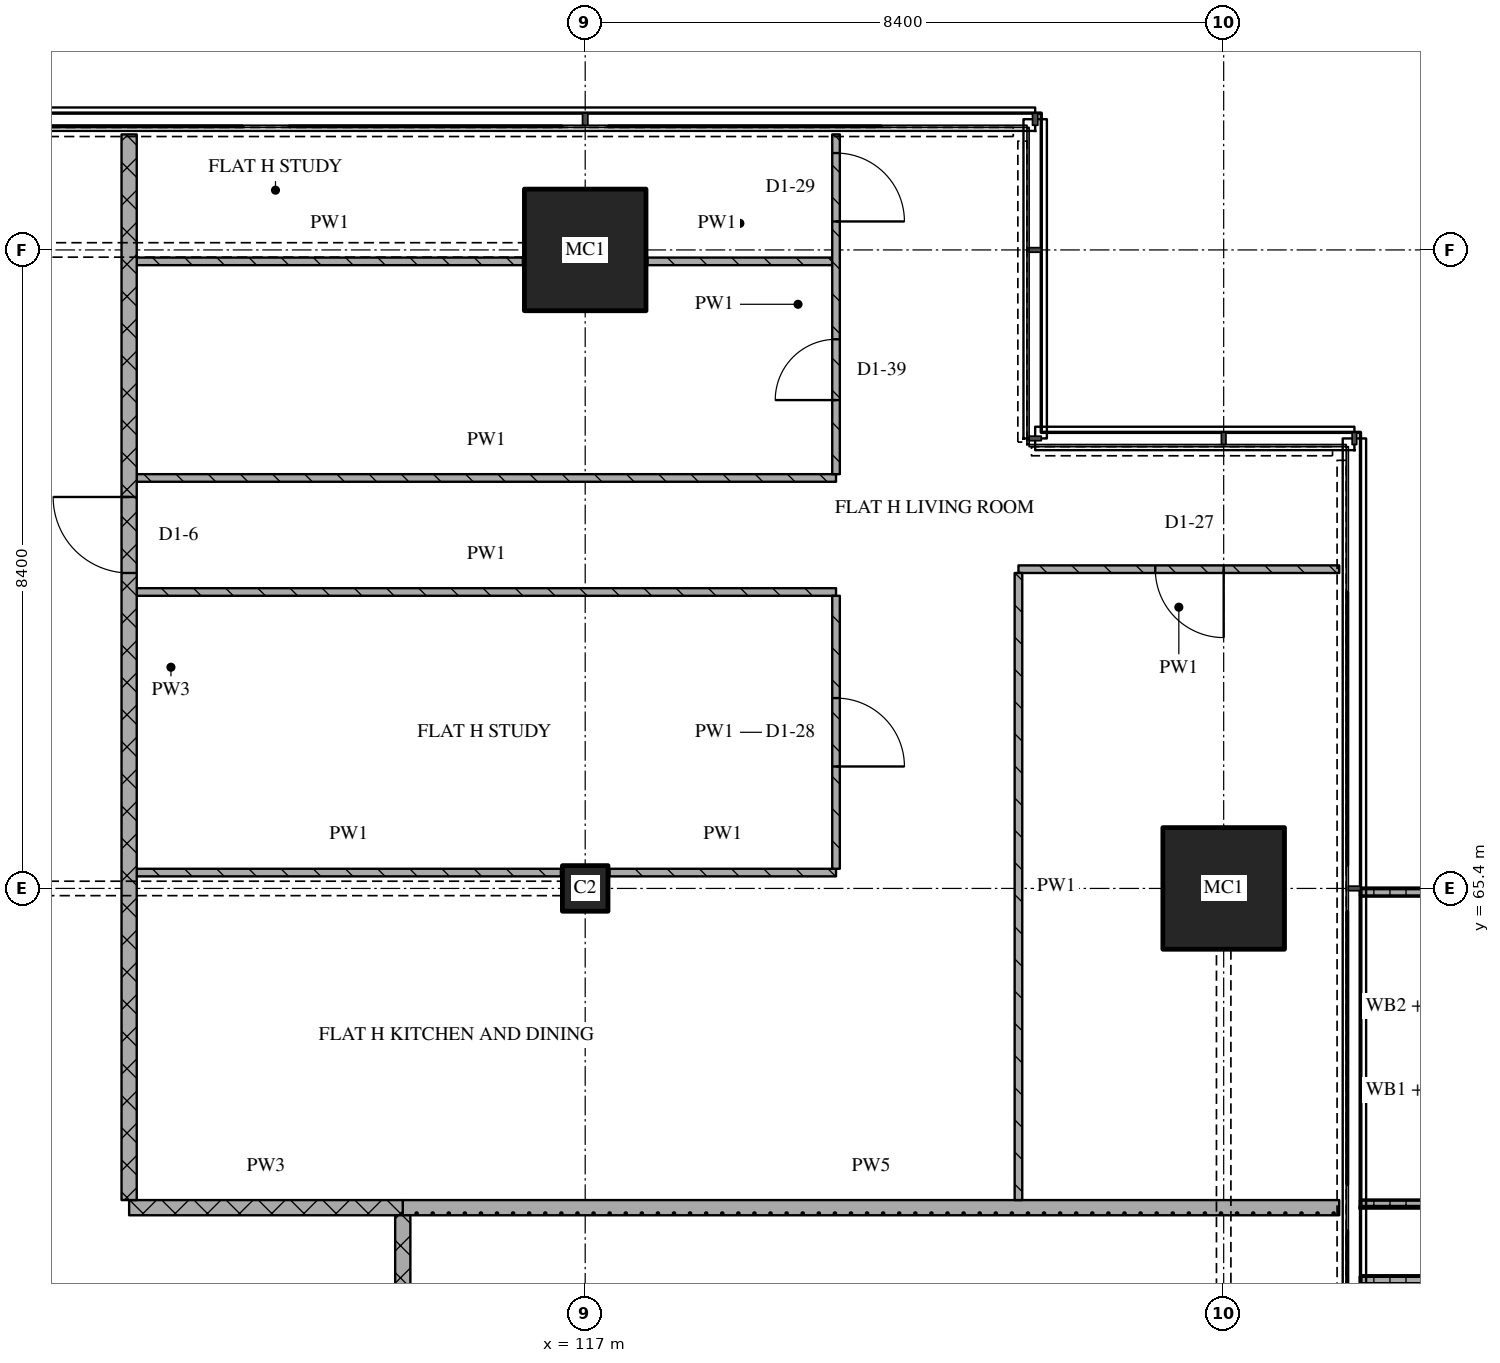
"""IFC4 building model, lengths in metres.
Left out: names, types, materials, properties, quantities, classifications, styles, units other than length and angle.
Written with IfcOpenShell. Run it as: python <this file> out.ifc"""

import sys

from ifc_helpers import new_model, si_unit, direction, frame, frame_2d, origin, origin_2d, place, context, subcontext, project, spatial, polyline, rectangle, outline, extrude, element, fill, save


model = new_model("IFC4")
c1 = context("Model", 3, precision=1e-05, world=origin(), true_north=direction((0.0, 1.0)))
c2 = subcontext(c1, "Body", "Model", "MODEL_VIEW")
j1 = project(units=[si_unit("LENGTHUNIT", "METRE"), si_unit("PLANEANGLEUNIT", "RADIAN")], contexts=[c1])
p1 = place(None, origin())
s1 = spatial("IfcSite", under=j1, at=p1, CompositionType="ELEMENT")
p2 = place(p1, origin())
s2 = spatial("IfcBuilding", under=s1, at=p2, CompositionType="ELEMENT")
p3 = place(p2, frame((0.0, 0.0, 209.1)))
s3 = spatial("IfcBuildingStorey", under=s2, at=p3, CompositionType="ELEMENT", Elevation=209.1)
p4 = place(p3, frame((117.0, 65.4, 0.0), z_axis=(0.0, 0.0, 1.0), x_axis=(1.0, 0.0, 0.0)))
e1 = element("IfcColumn", 1, at=p4, inside=s3, PredefinedType="COLUMN", context=c2, shape_type="SweptSolid", body=[
    extrude(rectangle(XDim=0.6, YDim=0.6, at=origin_2d()), origin(), (0.0, 0.0, 1.0), 3.6),
])
for number, where, z_axis, x_axis in (
    (2, (117.0, 73.8, 0.0), (0.0, 0.0, 1.0), (1.0, 0.0, 0.0)),
    (3, (125.4, 65.4, 0.0), (0.0, 0.0, 1.0), (1.0, 0.0, 0.0)),
):
    element("IfcColumn", number, at=place(p3, frame(where, z_axis=z_axis, x_axis=x_axis)), inside=s3, PredefinedType="COLUMN", context=c2, shape_type="SweptSolid", body=[
        extrude(rectangle(XDim=1.6, YDim=1.6, at=origin_2d()), origin(), (0.0, 0.0, 1.0), 3.6),
    ])
p5 = place(p3, origin())
e4 = element("IfcWall", 4, at=p5, inside=s3, PredefinedType="SOLIDWALL", context=c2, shape_type="SweptSolid", body=[
    extrude(outline(polyline([(127.2, 57.9), (127.2, 58.0), (128.7, 58.0), (128.7, 60.2), (127.2, 60.2), (127.2, 60.3), (128.8, 60.3), (128.8, 57.9), (127.2, 57.9)])), origin(), (0.0, 0.0, 1.0), 1.0),
])
p6 = place(p3, origin())
e5 = element("IfcWall", 5, at=p6, inside=s3, PredefinedType="SOLIDWALL", context=c2, shape_type="SweptSolid", body=[
    extrude(outline(polyline([(127.2, 61.2), (127.2, 61.3), (128.833, 61.3), (128.833, 65.3), (127.2, 65.3), (127.2, 65.4), (128.933, 65.4), (128.933, 61.2), (127.2, 61.2)])), origin(), (0.0, 0.0, 1.0), 1.0),
])
p7 = place(p3, frame((111.0, 61.2, 0.0), z_axis=(0.0, 0.0, 1.0), x_axis=(1.0, 0.0, 0.0)))
e6 = element("IfcWall", 6, at=p7, inside=s3, PredefinedType="PARTITIONING", context=c2, shape_type="SweptSolid", body=[
    extrude(rectangle(XDim=3.6, YDim=0.2, at=frame_2d((1.8, 0.0))), origin(), (0.0, 0.0, 1.0), 3.32),
])
p8 = place(p3, frame((114.6, 61.2, 0.0), z_axis=(0.0, 0.0, 1.0), x_axis=(1.0, 0.0, 0.0)))
e7 = element("IfcWall", 7, at=p8, inside=s3, PredefinedType="PARTITIONING", context=c2, shape_type="SweptSolid", body=[
    extrude(rectangle(XDim=12.32, YDim=0.2, at=frame_2d((6.16, 0.0))), origin(), (0.0, 0.0, 1.0), 3.32),
])
p9 = place(p3, frame((111.1, 65.609, 0.0), z_axis=(0.0, 0.0, 1.0), x_axis=(1.0, 0.0, 0.0)))
e8 = element("IfcWall", 8, at=p9, inside=s3, PredefinedType="PARTITIONING", context=c2, shape_type="SweptSolid", body=[
    extrude(rectangle(XDim=5.58, YDim=0.1, at=frame_2d((2.79, 0.0))), origin(), (0.0, 0.0, 1.0), 3.32),
])
p10 = place(p3, frame((117.32, 65.609, 0.0), z_axis=(0.0, 0.0, 1.0), x_axis=(1.0, 0.0, 0.0)))
e9 = element("IfcWall", 9, at=p10, inside=s3, PredefinedType="PARTITIONING", context=c2, shape_type="SweptSolid", body=[
    extrude(rectangle(XDim=2.98, YDim=0.1, at=frame_2d((1.49, 0.0))), origin(), (0.0, 0.0, 1.0), 3.32),
])
p11 = place(p3, frame((111.1, 69.3, 0.0), z_axis=(0.0, 0.0, 1.0), x_axis=(1.0, 0.0, 0.0)))
e10 = element("IfcWall", 10, at=p11, inside=s3, PredefinedType="PARTITIONING", context=c2, shape_type="SweptSolid", body=[
    extrude(rectangle(XDim=9.2, YDim=0.1, at=frame_2d((4.6, 0.0))), origin(), (0.0, 0.0, 1.0), 3.32),
])
p12 = place(p3, frame((126.92, 69.6, 0.0), z_axis=(0.0, 0.0, 1.0), x_axis=(-1.0, 0.0, 0.0)))
e11 = element("IfcWall", 11, at=p12, inside=s3, PredefinedType="PARTITIONING", context=c2, shape_type="SweptSolid", body=[
    extrude(rectangle(XDim=4.22, YDim=0.1, at=frame_2d((2.11, 0.0))), origin(), (0.0, 0.0, 1.0), 3.32),
])
p13 = place(p12, frame((1.52, 0.0, 0.0)))
e12 = element("IfcOpeningElement", 12, at=p13, cuts=e11, PredefinedType="OPENING", context=c2, shape_type="SweptSolid", body=[
    extrude(rectangle(XDim=0.9, YDim=2.1, at=frame_2d((0.45, 1.05))), frame((0.0, 0.06, 0.0), z_axis=(0.0, -1.0, 0.0), x_axis=(1.0, 0.0, 0.0)), (0.0, 0.0, 1.0), 0.12),
])
p14 = place(p3, frame((111.1, 70.8, 0.0), z_axis=(0.0, 0.0, 1.0), x_axis=(1.0, 0.0, 0.0)))
e13 = element("IfcWall", 13, at=p14, inside=s3, PredefinedType="PARTITIONING", context=c2, shape_type="SweptSolid", body=[
    extrude(rectangle(XDim=9.2, YDim=0.1, at=frame_2d((4.6, 0.0))), origin(), (0.0, 0.0, 1.0), 3.32),
])
p15 = place(p3, frame((111.1, 73.649, 0.0), z_axis=(0.0, 0.0, 1.0), x_axis=(1.0, 0.0, 0.0)))
e14 = element("IfcWall", 14, at=p15, inside=s3, PredefinedType="PARTITIONING", context=c2, shape_type="SweptSolid", body=[
    extrude(rectangle(XDim=5.08, YDim=0.1, at=frame_2d((2.54, 0.0))), origin(), (0.0, 0.0, 1.0), 3.32),
])
p16 = place(p3, frame((117.82, 73.649, 0.0), z_axis=(0.0, 0.0, 1.0), x_axis=(1.0, 0.0, 0.0)))
e15 = element("IfcWall", 15, at=p16, inside=s3, PredefinedType="PARTITIONING", context=c2, shape_type="SweptSolid", body=[
    extrude(rectangle(XDim=2.43, YDim=0.1, at=frame_2d((1.215, 0.0))), origin(), (0.0, 0.0, 1.0), 3.32),
])
p17 = place(p3, frame((111.0, 75.32, 0.0), z_axis=(0.0, 0.0, 1.0), x_axis=(0.0, -1.0, 0.0)))
e16 = element("IfcWall", 16, at=p17, inside=s3, PredefinedType="PARTITIONING", context=c2, shape_type="SweptSolid", body=[
    extrude(rectangle(XDim=14.02, YDim=0.2, at=frame_2d((7.01, 0.0))), origin(), (0.0, 0.0, 1.0), 3.32),
])
p18 = place(p17, frame((4.77, 0.0, 0.0)))
e17 = element("IfcOpeningElement", 17, at=p18, cuts=e16, PredefinedType="OPENING", context=c2, shape_type="SweptSolid", body=[
    extrude(rectangle(XDim=1.0, YDim=2.1, at=frame_2d((0.5, 1.05))), frame((0.0, 0.11, 0.0), z_axis=(0.0, -1.0, 0.0), x_axis=(1.0, 0.0, 0.0)), (0.0, 0.0, 1.0), 0.22),
])
p19 = place(p3, frame((114.6, 61.1, 0.0), z_axis=(0.0, 0.0, 1.0), x_axis=(0.0, -1.0, 0.0)))
e18 = element("IfcWall", 18, at=p19, inside=s3, PredefinedType="PARTITIONING", context=c2, shape_type="SweptSolid", body=[
    extrude(rectangle(XDim=17.8, YDim=0.2, at=frame_2d((8.9, 0.0))), origin(), (0.0, 0.0, 1.0), 3.32),
])
p20 = place(p19, frame((0.95, 0.0, 0.0)))
e19 = element("IfcOpeningElement", 19, at=p20, cuts=e18, PredefinedType="OPENING", context=c2, shape_type="SweptSolid", body=[
    extrude(rectangle(XDim=1.2, YDim=2.1, at=frame_2d((0.6, 1.05))), frame((0.0, 0.11, 0.0), z_axis=(0.0, -1.0, 0.0), x_axis=(1.0, 0.0, 0.0)), (0.0, 0.0, 1.0), 0.22),
])
p21 = place(p3, frame((120.3, 65.659, 0.0), z_axis=(0.0, 0.0, 1.0), x_axis=(0.0, 1.0, 0.0)))
e20 = element("IfcWall", 20, at=p21, inside=s3, PredefinedType="PARTITIONING", context=c2, shape_type="SweptSolid", body=[
    extrude(rectangle(XDim=3.591, YDim=0.1, at=frame_2d((1.796, 0.0))), origin(), (0.0, 0.0, 1.0), 3.32),
])
p22 = place(p21, frame((1.346, 0.0, 0.0)))
e21 = element("IfcOpeningElement", 21, at=p22, cuts=e20, PredefinedType="OPENING", context=c2, shape_type="SweptSolid", body=[
    extrude(rectangle(XDim=0.9, YDim=2.1, at=frame_2d((0.45, 1.05))), frame((0.0, 0.06, 0.0), z_axis=(0.0, -1.0, 0.0), x_axis=(1.0, 0.0, 0.0)), (0.0, 0.0, 1.0), 0.12),
])
p23 = place(p3, frame((120.3, 70.85, 0.0), z_axis=(0.0, 0.0, 1.0), x_axis=(0.0, 1.0, 0.0)))
e22 = element("IfcWall", 22, at=p23, inside=s3, PredefinedType="PARTITIONING", context=c2, shape_type="SweptSolid", body=[
    extrude(rectangle(XDim=4.47, YDim=0.1, at=frame_2d((2.235, 0.0))), origin(), (0.0, 0.0, 1.0), 3.32),
])
p24 = place(p23, frame((0.975, 0.0, 0.0)))
e23 = element("IfcOpeningElement", 23, at=p24, cuts=e22, PredefinedType="OPENING", context=c2, shape_type="SweptSolid", body=[
    extrude(rectangle(XDim=0.8, YDim=2.1, at=frame_2d((0.4, 1.05))), frame((0.0, 0.06, 0.0), z_axis=(0.0, -1.0, 0.0), x_axis=(1.0, 0.0, 0.0)), (0.0, 0.0, 1.0), 0.12),
])
p25 = place(p23, frame((3.325, 0.0, 0.0)))
e24 = element("IfcOpeningElement", 24, at=p25, cuts=e22, PredefinedType="OPENING", context=c2, shape_type="SweptSolid", body=[
    extrude(rectangle(XDim=0.9, YDim=2.1, at=frame_2d((0.45, 1.05))), frame((0.0, 0.06, 0.0), z_axis=(0.0, -1.0, 0.0), x_axis=(1.0, 0.0, 0.0)), (0.0, 0.0, 1.0), 0.12),
])
p26 = place(p3, frame((122.7, 69.55, 0.0), z_axis=(0.0, 0.0, 1.0), x_axis=(0.0, -1.0, 0.0)))
e25 = element("IfcWall", 25, at=p26, inside=s3, PredefinedType="PARTITIONING", context=c2, shape_type="SweptSolid", body=[
    extrude(rectangle(XDim=8.25, YDim=0.1, at=frame_2d((4.125, 0.0))), origin(), (0.0, 0.0, 1.0), 3.32),
])
p27 = place(p13, origin())
e26 = element("IfcDoor", 26, at=p27, inside=s3, OperationType="SINGLE_SWING_LEFT", PredefinedType="DOOR", context=c2, shape_type="SweptSolid", body=[
    extrude(rectangle(XDim=0.9, YDim=2.1, at=frame_2d((0.45, 1.05))), frame((0.0, 0.025, 0.0), z_axis=(0.0, -1.0, 0.0), x_axis=(1.0, 0.0, 0.0)), (0.0, 0.0, 1.0), 0.05),
])
fill(e12, e26)
p28 = place(p18, origin())
e27 = element("IfcDoor", 27, at=p28, inside=s3, OperationType="SINGLE_SWING_RIGHT", PredefinedType="DOOR", context=c2, shape_type="SweptSolid", body=[
    extrude(rectangle(XDim=1.0, YDim=2.1, at=frame_2d((0.5, 1.05))), frame((0.0, 0.025, 0.0), z_axis=(0.0, -1.0, 0.0), x_axis=(1.0, 0.0, 0.0)), (0.0, 0.0, 1.0), 0.05),
])
fill(e17, e27)
p29 = place(p22, origin())
e28 = element("IfcDoor", 28, at=p29, inside=s3, OperationType="SINGLE_SWING_RIGHT", PredefinedType="DOOR", context=c2, shape_type="SweptSolid", body=[
    extrude(rectangle(XDim=0.9, YDim=2.1, at=frame_2d((0.45, 1.05))), frame((0.0, 0.025, 0.0), z_axis=(0.0, -1.0, 0.0), x_axis=(1.0, 0.0, 0.0)), (0.0, 0.0, 1.0), 0.05),
])
fill(e21, e28)
p30 = place(p24, origin())
e29 = element("IfcDoor", 29, at=p30, inside=s3, OperationType="SINGLE_SWING_LEFT", PredefinedType="DOOR", context=c2, shape_type="SweptSolid", body=[
    extrude(rectangle(XDim=0.8, YDim=2.1, at=frame_2d((0.4, 1.05))), frame((0.0, 0.025, 0.0), z_axis=(0.0, -1.0, 0.0), x_axis=(1.0, 0.0, 0.0)), (0.0, 0.0, 1.0), 0.05),
])
fill(e23, e29)
p31 = place(p25, origin())
e30 = element("IfcDoor", 30, at=p31, inside=s3, OperationType="SINGLE_SWING_RIGHT", PredefinedType="DOOR", context=c2, shape_type="SweptSolid", body=[
    extrude(rectangle(XDim=0.9, YDim=2.1, at=frame_2d((0.45, 1.05))), frame((0.0, 0.025, 0.0), z_axis=(0.0, -1.0, 0.0), x_axis=(1.0, 0.0, 0.0)), (0.0, 0.0, 1.0), 0.05),
])
fill(e24, e30)
save(model, sys.argv[1])
